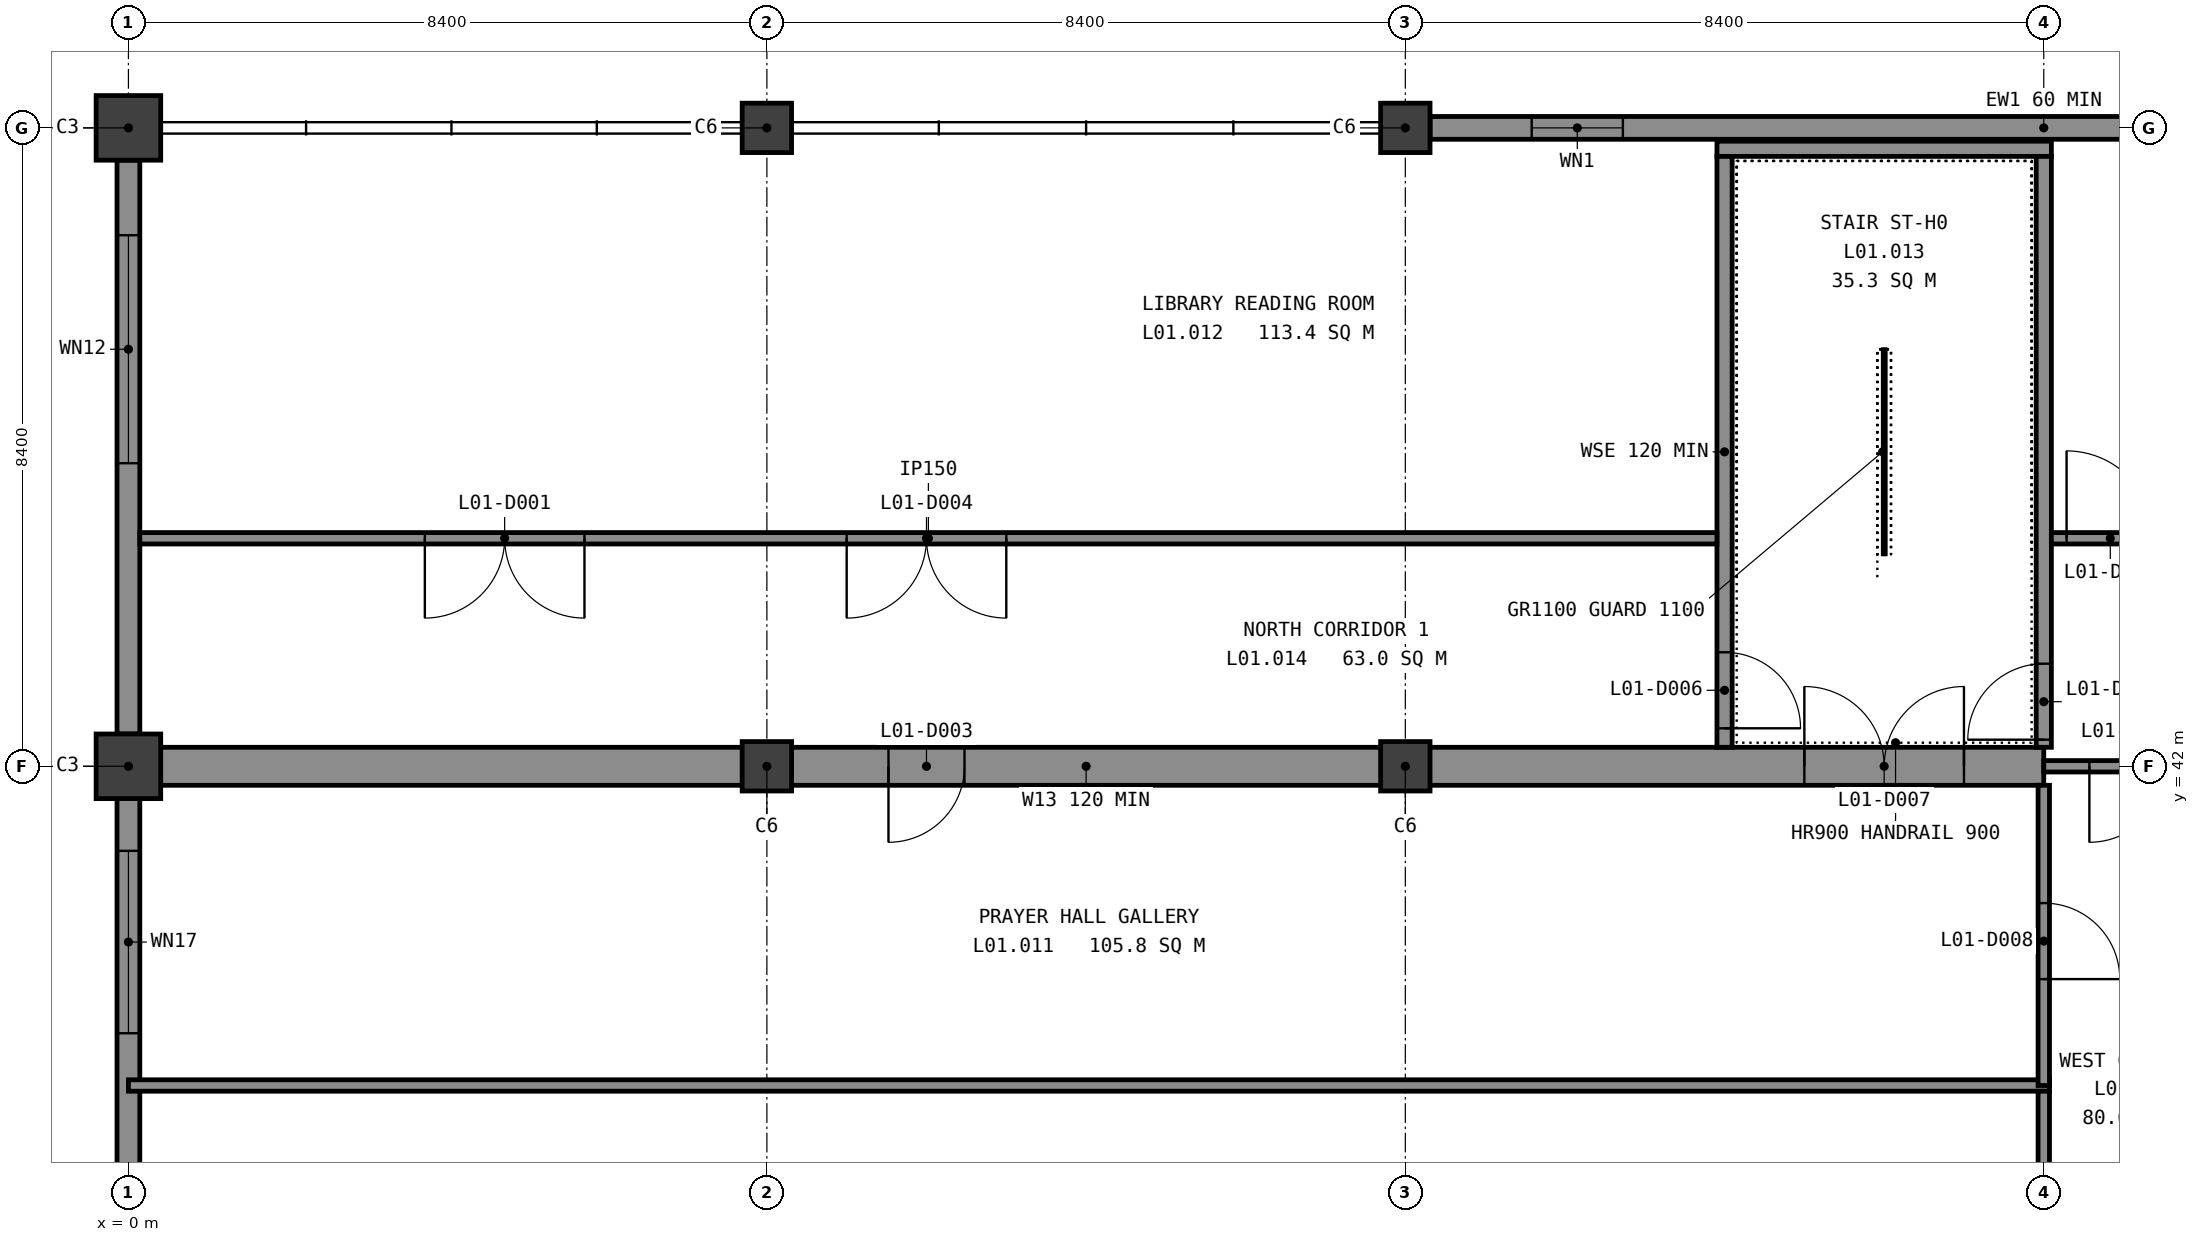
"""IFC4 building model, lengths in metres.
Left out: names, types, materials, properties, quantities, classifications, styles, units other than length and angle.
Written with IfcOpenShell. Run it as: python <this file> out.ifc"""

import sys

from ifc_helpers import new_model, si_unit, direction, frame, frame_2d, origin, origin_2d, place, context, subcontext, project, spatial, rectangle, extrude, element, fill, save


model = new_model("IFC4")
c1 = context("Model", 3, precision=1e-05, world=origin(), true_north=direction((0.0, 1.0)))
c2 = subcontext(c1, "Body", "Model", "MODEL_VIEW")
j1 = project(units=[si_unit("LENGTHUNIT", "METRE"), si_unit("PLANEANGLEUNIT", "RADIAN")], contexts=[c1])
p1 = place(None, origin())
s1 = spatial("IfcSite", under=j1, at=p1, CompositionType="ELEMENT")
p2 = place(p1, origin())
s2 = spatial("IfcBuilding", under=s1, at=p2, CompositionType="ELEMENT")
p3 = place(p2, frame((0.0, 0.0, 5.4)))
s3 = spatial("IfcBuildingStorey", under=s2, at=p3, CompositionType="ELEMENT", Elevation=5.4)
for number, where, z_axis, x_axis in (
    (1, (0.0, 42.0, -0.3), (0.0, 0.0, 1.0), (1.0, 0.0, 0.0)),
    (2, (0.0, 50.4, -0.3), (0.0, 0.0, 1.0), (1.0, 0.0, 0.0)),
):
    element("IfcColumn", number, at=place(p3, frame(where, z_axis=z_axis, x_axis=x_axis)), inside=s3, PredefinedType="COLUMN", context=c2, shape_type="SweptSolid", body=[
        extrude(rectangle(XDim=0.85, YDim=0.85, at=origin_2d()), origin(), (0.0, 0.0, 1.0), 4.55),
    ])
for number, where, z_axis, x_axis in (
    (3, (8.4, 42.0, -0.3), (0.0, 0.0, 1.0), (1.0, 0.0, 0.0)),
    (4, (8.4, 50.4, -0.3), (0.0, 0.0, 1.0), (1.0, 0.0, 0.0)),
    (5, (16.8, 42.0, -0.3), (0.0, 0.0, 1.0), (1.0, 0.0, 0.0)),
    (6, (16.8, 50.4, -0.3), (0.0, 0.0, 1.0), (1.0, 0.0, 0.0)),
):
    element("IfcColumn", number, at=place(p3, frame(where, z_axis=z_axis, x_axis=x_axis)), inside=s3, PredefinedType="COLUMN", context=c2, shape_type="SweptSolid", body=[
        extrude(rectangle(XDim=0.65, YDim=0.65, at=origin_2d()), origin(), (0.0, 0.0, 1.0), 4.55),
    ])
p4 = place(p3, frame((0.0, 42.0, -0.3), z_axis=(0.0, 0.0, 1.0), x_axis=(1.0, 0.0, 0.0)))
e7 = element("IfcWall", 7, at=p4, inside=s3, PredefinedType="SHEAR", context=c2, shape_type="SweptSolid", body=[
    extrude(rectangle(XDim=25.2, YDim=0.5, at=frame_2d((12.6, 0.0))), origin(), (0.0, 0.0, 1.0), 4.55),
])
p5 = place(p4, frame((22.05, 0.0, 0.3)))
e8 = element("IfcOpeningElement", 8, at=p5, cuts=e7, PredefinedType="OPENING", context=c2, shape_type="SweptSolid", body=[
    extrude(rectangle(XDim=2.1, YDim=2.1, at=frame_2d((1.05, 1.05))), frame((0.0, 0.26, 0.0), z_axis=(0.0, -1.0, 0.0), x_axis=(1.0, 0.0, 0.0)), (0.0, 0.0, 1.0), 0.52),
])
p6 = place(p4, frame((10.0, 0.0, 0.3)))
e9 = element("IfcOpeningElement", 9, at=p6, cuts=e7, PredefinedType="OPENING", context=c2, shape_type="SweptSolid", body=[
    extrude(rectangle(XDim=1.0, YDim=2.1, at=frame_2d((0.5, 1.05))), frame((0.0, 0.26, 0.0), z_axis=(0.0, -1.0, 0.0), x_axis=(1.0, 0.0, 0.0)), (0.0, 0.0, 1.0), 0.52),
])
p7 = place(p3, frame((17.125, 50.4, 0.0), z_axis=(0.0, 0.0, 1.0), x_axis=(1.0, 0.0, 0.0)))
e10 = element("IfcWall", 10, at=p7, inside=s3, PredefinedType="STANDARD", context=c2, shape_type="SweptSolid", body=[
    extrude(rectangle(XDim=16.15, YDim=0.3, at=frame_2d((8.075, 0.0))), origin(), (0.0, 0.0, 1.0), 4.2),
])
p8 = place(p7, frame((1.337, 0.0, 0.9)))
e11 = element("IfcOpeningElement", 11, at=p8, cuts=e10, PredefinedType="OPENING", context=c2, shape_type="SweptSolid", body=[
    extrude(rectangle(XDim=1.2, YDim=1.5, at=frame_2d((0.6, 0.75))), frame((0.0, 0.16, 0.0), z_axis=(0.0, -1.0, 0.0), x_axis=(1.0, 0.0, 0.0)), (0.0, 0.0, 1.0), 0.32),
])
p9 = place(p7, frame((10.025, 0.0, 0.9)))
e12 = element("IfcOpeningElement", 12, at=p9, cuts=e10, PredefinedType="OPENING", context=c2, shape_type="SweptSolid", body=[
    extrude(rectangle(XDim=4.2, YDim=1.5, at=frame_2d((2.1, 0.75))), frame((0.0, 0.16, 0.0), z_axis=(0.0, -1.0, 0.0), x_axis=(1.0, 0.0, 0.0)), (0.0, 0.0, 1.0), 0.32),
])
p10 = place(p3, frame((0.0, 8.825, 0.0), z_axis=(0.0, 0.0, 1.0), x_axis=(0.0, 1.0, 0.0)))
e13 = element("IfcWall", 13, at=p10, inside=s3, PredefinedType="STANDARD", context=c2, shape_type="SweptSolid", body=[
    extrude(rectangle(XDim=32.75, YDim=0.3, at=frame_2d((16.375, 0.0))), origin(), (0.0, 0.0, 1.0), 3.4),
])
p11 = place(p10, frame((29.663, 0.0, 0.9)))
e14 = element("IfcOpeningElement", 14, at=p11, cuts=e13, PredefinedType="OPENING", context=c2, shape_type="SweptSolid", body=[
    extrude(rectangle(XDim=2.4, YDim=1.5, at=frame_2d((1.2, 0.75))), frame((0.0, 0.16, 0.0), z_axis=(0.0, -1.0, 0.0), x_axis=(1.0, 0.0, 0.0)), (0.0, 0.0, 1.0), 0.32),
])
p12 = place(p3, frame((0.0, 42.425, 0.0), z_axis=(0.0, 0.0, 1.0), x_axis=(0.0, 1.0, 0.0)))
e15 = element("IfcWall", 15, at=p12, inside=s3, PredefinedType="STANDARD", context=c2, shape_type="SweptSolid", body=[
    extrude(rectangle(XDim=7.55, YDim=0.3, at=frame_2d((3.775, 0.0))), origin(), (0.0, 0.0, 1.0), 3.6),
])
p13 = place(p12, frame((3.562, 0.0, 2.4)))
e16 = element("IfcOpeningElement", 16, at=p13, cuts=e15, PredefinedType="OPENING", context=c2, shape_type="SweptSolid", body=[
    extrude(rectangle(XDim=3.0, YDim=0.9, at=frame_2d((1.5, 0.45))), frame((0.0, 0.16, 0.0), z_axis=(0.0, -1.0, 0.0), x_axis=(1.0, 0.0, 0.0)), (0.0, 0.0, 1.0), 0.32),
])
p14 = place(p3, frame((20.9, 50.125, -0.3), z_axis=(0.0, 0.0, 1.0), x_axis=(1.0, 0.0, 0.0)))
e17 = element("IfcWall", 17, at=p14, inside=s3, PredefinedType="SHEAR", context=c2, shape_type="SweptSolid", body=[
    extrude(rectangle(XDim=4.4, YDim=0.2, at=frame_2d((2.2, 0.0))), origin(), (0.0, 0.0, 1.0), 4.5),
])
p15 = place(p3, frame((21.0, 42.25, -0.3), z_axis=(0.0, 0.0, 1.0), x_axis=(0.0, 1.0, 0.0)))
e18 = element("IfcWall", 18, at=p15, inside=s3, PredefinedType="SHEAR", context=c2, shape_type="SweptSolid", body=[
    extrude(rectangle(XDim=7.775, YDim=0.2, at=frame_2d((3.887, 0.0))), origin(), (0.0, 0.0, 1.0), 4.5),
])
p16 = place(p15, frame((0.25, 0.0, 0.3)))
e19 = element("IfcOpeningElement", 19, at=p16, cuts=e18, PredefinedType="OPENING", context=c2, shape_type="SweptSolid", body=[
    extrude(rectangle(XDim=1.0, YDim=2.1, at=frame_2d((0.5, 1.05))), frame((0.0, 0.11, 0.0), z_axis=(0.0, -1.0, 0.0), x_axis=(1.0, 0.0, 0.0)), (0.0, 0.0, 1.0), 0.22),
])
p17 = place(p3, frame((25.2, 42.25, -0.3), z_axis=(0.0, 0.0, 1.0), x_axis=(0.0, 1.0, 0.0)))
e20 = element("IfcWall", 20, at=p17, inside=s3, PredefinedType="SHEAR", context=c2, shape_type="SweptSolid", body=[
    extrude(rectangle(XDim=7.775, YDim=0.2, at=frame_2d((3.887, 0.0))), origin(), (0.0, 0.0, 1.0), 4.5),
])
p18 = place(p17, frame((0.1, 0.0, 0.3)))
e21 = element("IfcOpeningElement", 21, at=p18, cuts=e20, PredefinedType="OPENING", context=c2, shape_type="SweptSolid", body=[
    extrude(rectangle(XDim=1.0, YDim=2.1, at=frame_2d((0.5, 1.05))), frame((0.0, 0.11, 0.0), z_axis=(0.0, -1.0, 0.0), x_axis=(1.0, 0.0, 0.0)), (0.0, 0.0, 1.0), 0.22),
])
p19 = place(p3, frame((0.0, 37.8, -0.3), z_axis=(0.0, 0.0, 1.0), x_axis=(1.0, 0.0, 0.0)))
e22 = element("IfcWall", 22, at=p19, inside=s3, PredefinedType="PARTITIONING", context=c2, shape_type="SweptSolid", body=[
    extrude(rectangle(XDim=25.275, YDim=0.15, at=frame_2d((12.637, 0.0))), origin(), (0.0, 0.0, 1.0), 4.5),
])
p20 = place(p3, frame((25.2, 8.65, -0.3), z_axis=(0.0, 0.0, 1.0), x_axis=(0.0, 1.0, 0.0)))
e23 = element("IfcWall", 23, at=p20, inside=s3, PredefinedType="PARTITIONING", context=c2, shape_type="SweptSolid", body=[
    extrude(rectangle(XDim=29.075, YDim=0.15, at=frame_2d((14.538, 0.0))), origin(), (0.0, 0.0, 1.0), 3.9),
])
p21 = place(p3, frame((25.2, 42.0, 0.0), z_axis=(0.0, 0.0, 1.0), x_axis=(1.0, 0.0, 0.0)))
e24 = element("IfcWall", 24, at=p21, inside=s3, PredefinedType="PARTITIONING", context=c2, shape_type="SweptSolid", body=[
    extrude(rectangle(XDim=12.5, YDim=0.15, at=frame_2d((6.25, 0.0))), origin(), (0.0, 0.0, 1.0), 4.2),
])
p22 = place(p21, frame((0.6, 0.0, 0.0)))
e25 = element("IfcOpeningElement", 25, at=p22, cuts=e24, PredefinedType="OPENING", context=c2, shape_type="SweptSolid", body=[
    extrude(rectangle(XDim=1.0, YDim=2.1, at=frame_2d((0.5, 1.05))), frame((0.0, 0.085, 0.0), z_axis=(0.0, -1.0, 0.0), x_axis=(1.0, 0.0, 0.0)), (0.0, 0.0, 1.0), 0.17),
])
p23 = place(p3, frame((0.15, 45.0, 0.0), z_axis=(0.0, 0.0, 1.0), x_axis=(1.0, 0.0, 0.0)))
e26 = element("IfcWall", 26, at=p23, inside=s3, PredefinedType="PARTITIONING", context=c2, shape_type="SweptSolid", body=[
    extrude(rectangle(XDim=20.75, YDim=0.15, at=frame_2d((10.375, 0.0))), origin(), (0.0, 0.0, 1.0), 4.2),
])
p24 = place(p23, frame((9.3, 0.0, 0.0)))
e27 = element("IfcOpeningElement", 27, at=p24, cuts=e26, PredefinedType="OPENING", context=c2, shape_type="SweptSolid", body=[
    extrude(rectangle(XDim=2.1, YDim=2.25, at=frame_2d((1.05, 1.125))), frame((0.0, 0.085, 0.0), z_axis=(0.0, -1.0, 0.0), x_axis=(1.0, 0.0, 0.0)), (0.0, 0.0, 1.0), 0.17),
])
p25 = place(p23, frame((3.75, 0.0, 0.0)))
e28 = element("IfcOpeningElement", 28, at=p25, cuts=e26, PredefinedType="OPENING", context=c2, shape_type="SweptSolid", body=[
    extrude(rectangle(XDim=2.1, YDim=2.25, at=frame_2d((1.05, 1.125))), frame((0.0, 0.085, 0.0), z_axis=(0.0, -1.0, 0.0), x_axis=(1.0, 0.0, 0.0)), (0.0, 0.0, 1.0), 0.17),
])
p26 = place(p3, frame((25.3, 45.0, 0.0), z_axis=(0.0, 0.0, 1.0), x_axis=(1.0, 0.0, 0.0)))
e29 = element("IfcWall", 29, at=p26, inside=s3, PredefinedType="PARTITIONING", context=c2, shape_type="SweptSolid", body=[
    extrude(rectangle(XDim=12.4, YDim=0.15, at=frame_2d((6.2, 0.0))), origin(), (0.0, 0.0, 1.0), 4.2),
])
p27 = place(p26, frame((0.2, 0.0, 0.0)))
e30 = element("IfcOpeningElement", 30, at=p27, cuts=e29, PredefinedType="OPENING", context=c2, shape_type="SweptSolid", body=[
    extrude(rectangle(XDim=1.15, YDim=2.1, at=frame_2d((0.575, 1.05))), frame((0.0, 0.085, 0.0), z_axis=(0.0, -1.0, 0.0), x_axis=(1.0, 0.0, 0.0)), (0.0, 0.0, 1.0), 0.17),
])
p28 = place(p26, frame((11.05, 0.0, 0.0)))
e31 = element("IfcOpeningElement", 31, at=p28, cuts=e29, PredefinedType="OPENING", context=c2, shape_type="SweptSolid", body=[
    extrude(rectangle(XDim=1.15, YDim=2.1, at=frame_2d((0.575, 1.05))), frame((0.0, 0.085, 0.0), z_axis=(0.0, -1.0, 0.0), x_axis=(1.0, 0.0, 0.0)), (0.0, 0.0, 1.0), 0.17),
])
p29 = place(p3, frame((25.2, 37.8, 0.0), z_axis=(0.0, 0.0, 1.0), x_axis=(0.0, 1.0, 0.0)))
e32 = element("IfcWall", 32, at=p29, inside=s3, PredefinedType="PARTITIONING", context=c2, shape_type="SweptSolid", body=[
    extrude(rectangle(XDim=3.95, YDim=0.15, at=frame_2d((1.975, 0.0))), origin(), (0.0, 0.0, 1.0), 3.6),
])
p30 = place(p29, frame((1.4, 0.0, 0.0)))
e33 = element("IfcOpeningElement", 33, at=p30, cuts=e32, PredefinedType="OPENING", context=c2, shape_type="SweptSolid", body=[
    extrude(rectangle(XDim=1.0, YDim=2.1, at=frame_2d((0.5, 1.05))), frame((0.0, 0.085, 0.0), z_axis=(0.0, -1.0, 0.0), x_axis=(1.0, 0.0, 0.0)), (0.0, 0.0, 1.0), 0.17),
])
p31 = place(p8, origin())
e34 = element("IfcWindow", 34, at=p31, inside=s3, PartitioningType="SINGLE_PANEL", PredefinedType="WINDOW", context=c2, shape_type="SweptSolid", body=[
    extrude(rectangle(XDim=1.2, YDim=1.5, at=frame_2d((0.6, 0.75))), frame((0.0, 0.03, 0.0), z_axis=(0.0, -1.0, 0.0), x_axis=(1.0, 0.0, 0.0)), (0.0, 0.0, 1.0), 0.06),
])
fill(e11, e34)
p32 = place(p11, origin())
e35 = element("IfcWindow", 35, at=p32, inside=s3, PartitioningType="SINGLE_PANEL", PredefinedType="WINDOW", context=c2, shape_type="SweptSolid", body=[
    extrude(rectangle(XDim=2.4, YDim=1.5, at=frame_2d((1.2, 0.75))), frame((0.0, 0.03, 0.0), z_axis=(0.0, -1.0, 0.0), x_axis=(1.0, 0.0, 0.0)), (0.0, 0.0, 1.0), 0.06),
])
fill(e14, e35)
p33 = place(p13, origin())
e36 = element("IfcWindow", 36, at=p33, inside=s3, PartitioningType="SINGLE_PANEL", PredefinedType="WINDOW", context=c2, shape_type="SweptSolid", body=[
    extrude(rectangle(XDim=3.0, YDim=0.9, at=frame_2d((1.5, 0.45))), frame((0.0, 0.03, 0.0), z_axis=(0.0, -1.0, 0.0), x_axis=(1.0, 0.0, 0.0)), (0.0, 0.0, 1.0), 0.06),
])
fill(e16, e36)
p34 = place(p5, origin())
e37 = element("IfcDoor", 37, at=p34, inside=s3, OperationType="DOUBLE_DOOR_SINGLE_SWING", PredefinedType="DOOR", context=c2, shape_type="SweptSolid", body=[
    extrude(rectangle(XDim=2.1, YDim=2.1, at=frame_2d((1.05, 1.05))), frame((0.0, 0.025, 0.0), z_axis=(0.0, -1.0, 0.0), x_axis=(1.0, 0.0, 0.0)), (0.0, 0.0, 1.0), 0.05),
])
fill(e8, e37)
p35 = place(p18, origin())
e38 = element("IfcDoor", 38, at=p35, inside=s3, OperationType="SINGLE_SWING_RIGHT", PredefinedType="DOOR", context=c2, shape_type="SweptSolid", body=[
    extrude(rectangle(XDim=1.0, YDim=2.1, at=frame_2d((0.5, 1.05))), frame((0.0, 0.025, 0.0), z_axis=(0.0, -1.0, 0.0), x_axis=(1.0, 0.0, 0.0)), (0.0, 0.0, 1.0), 0.05),
])
fill(e21, e38)
p36 = place(p24, origin())
e39 = element("IfcDoor", 39, at=p36, inside=s3, OperationType="DOUBLE_DOOR_SINGLE_SWING", PredefinedType="DOOR", context=c2, shape_type="SweptSolid", body=[
    extrude(rectangle(XDim=2.1, YDim=2.25, at=frame_2d((1.05, 1.125))), frame((0.0, 0.025, 0.0), z_axis=(0.0, -1.0, 0.0), x_axis=(1.0, 0.0, 0.0)), (0.0, 0.0, 1.0), 0.05),
])
fill(e27, e39)
p37 = place(p25, origin())
e40 = element("IfcDoor", 40, at=p37, inside=s3, OperationType="DOUBLE_DOOR_SINGLE_SWING", PredefinedType="DOOR", context=c2, shape_type="SweptSolid", body=[
    extrude(rectangle(XDim=2.1, YDim=2.25, at=frame_2d((1.05, 1.125))), frame((0.0, 0.025, 0.0), z_axis=(0.0, -1.0, 0.0), x_axis=(1.0, 0.0, 0.0)), (0.0, 0.0, 1.0), 0.05),
])
fill(e28, e40)
p38 = place(p27, origin())
e41 = element("IfcDoor", 41, at=p38, inside=s3, OperationType="SINGLE_SWING_RIGHT", PredefinedType="DOOR", context=c2, shape_type="SweptSolid", body=[
    extrude(rectangle(XDim=1.15, YDim=2.1, at=frame_2d((0.575, 1.05))), frame((0.0, 0.025, 0.0), z_axis=(0.0, -1.0, 0.0), x_axis=(1.0, 0.0, 0.0)), (0.0, 0.0, 1.0), 0.05),
])
fill(e30, e41)
p39 = place(p6, origin())
e42 = element("IfcDoor", 42, at=p39, inside=s3, OperationType="SINGLE_SWING_LEFT", PredefinedType="DOOR", context=c2, shape_type="SweptSolid", body=[
    extrude(rectangle(XDim=1.0, YDim=2.1, at=frame_2d((0.5, 1.05))), frame((0.0, 0.025, 0.0), z_axis=(0.0, -1.0, 0.0), x_axis=(1.0, 0.0, 0.0)), (0.0, 0.0, 1.0), 0.05),
])
fill(e9, e42)
p40 = place(p30, origin())
e43 = element("IfcDoor", 43, at=p40, inside=s3, OperationType="SINGLE_SWING_LEFT", PredefinedType="DOOR", context=c2, shape_type="SweptSolid", body=[
    extrude(rectangle(XDim=1.0, YDim=2.1, at=frame_2d((0.5, 1.05))), frame((0.0, 0.025, 0.0), z_axis=(0.0, -1.0, 0.0), x_axis=(1.0, 0.0, 0.0)), (0.0, 0.0, 1.0), 0.05),
])
fill(e33, e43)
p41 = place(p16, origin())
e44 = element("IfcDoor", 44, at=p41, inside=s3, OperationType="SINGLE_SWING_LEFT", PredefinedType="DOOR", context=c2, shape_type="SweptSolid", body=[
    extrude(rectangle(XDim=1.0, YDim=2.1, at=frame_2d((0.5, 1.05))), frame((0.0, 0.025, 0.0), z_axis=(0.0, -1.0, 0.0), x_axis=(1.0, 0.0, 0.0)), (0.0, 0.0, 1.0), 0.05),
])
fill(e19, e44)
p42 = place(p22, origin())
e45 = element("IfcDoor", 45, at=p42, inside=s3, OperationType="SINGLE_SWING_LEFT", PredefinedType="DOOR", context=c2, shape_type="SweptSolid", body=[
    extrude(rectangle(XDim=1.0, YDim=2.1, at=frame_2d((0.5, 1.05))), frame((0.0, 0.025, 0.0), z_axis=(0.0, -1.0, 0.0), x_axis=(1.0, 0.0, 0.0)), (0.0, 0.0, 1.0), 0.05),
])
fill(e25, e45)
save(model, sys.argv[1])
